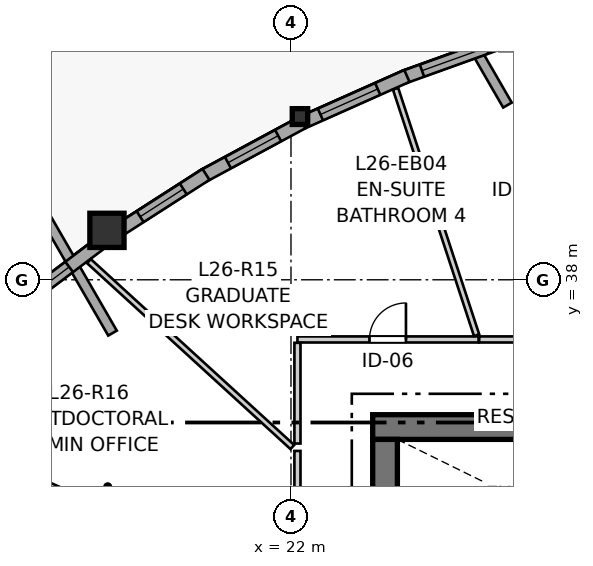
"""IFC4 building model, lengths in metres.
Left out: names, types, materials, properties, quantities, classifications, styles, units other than length and angle.
Written with IfcOpenShell. Run it as: python <this file> out.ifc"""

import sys

from ifc_helpers import new_model, si_unit, direction, frame, frame_2d, origin, origin_2d, place, context, subcontext, project, spatial, rectangle, i_section, extrude, source, transform, mapped, element, fill, save


model = new_model("IFC4")
c1 = context("Model", 3, precision=1e-05, world=origin(), true_north=direction((0.0, 1.0)))
c2 = subcontext(c1, "Body", "Model", "MODEL_VIEW")
j1 = project(units=[si_unit("LENGTHUNIT", "METRE"), si_unit("PLANEANGLEUNIT", "RADIAN")], contexts=[c1])
p1 = place(None, origin())
s1 = spatial("IfcSite", under=j1, at=p1, CompositionType="ELEMENT")
p2 = place(p1, origin())
s2 = spatial("IfcBuilding", under=s1, at=p2, CompositionType="ELEMENT")
p3 = place(p2, frame((0.0, 0.0, 89.6)))
s3 = spatial("IfcBuildingStorey", under=s2, at=p3, CompositionType="ELEMENT", Elevation=89.6)
p4 = place(p3, frame((36.55, 34.125, 0.0), z_axis=(0.0, 0.0, 1.0), x_axis=(-1.0, 0.0, 0.0)))
e1 = element("IfcWall", 1, at=p4, inside=s3, PredefinedType="SHEAR", context=c2, shape_type="SweptSolid", body=[
    extrude(rectangle(XDim=12.4, YDim=0.65, at=frame_2d((6.2, 0.0))), origin(), (0.0, 0.0, 1.0), 2.95),
])
p5 = place(p3, frame((24.475, 33.8, 0.0), z_axis=(0.0, 0.0, 1.0), x_axis=(0.0, -1.0, 0.0)))
e2 = element("IfcWall", 2, at=p5, inside=s3, PredefinedType="SHEAR", context=c2, shape_type="SweptSolid", body=[
    extrude(rectangle(XDim=15.6, YDim=0.65, at=frame_2d((7.8, 0.0))), origin(), (0.0, 0.0, 1.0), 2.95),
])
p6 = place(p5, frame((7.05, 0.0, 0.0)))
e3 = element("IfcOpeningElement", 3, at=p6, cuts=e2, PredefinedType="OPENING", context=c2, shape_type="SweptSolid", body=[
    extrude(rectangle(XDim=1.5, YDim=2.15, at=frame_2d((0.75, 1.075))), frame((0.0, 0.335, 0.0), z_axis=(0.0, -1.0, 0.0), x_axis=(1.0, 0.0, 0.0)), (0.0, 0.0, 1.0), 0.67),
])
p7 = place(p5, frame((3.52, 0.0, 0.0)))
e4 = element("IfcOpeningElement", 4, at=p7, cuts=e2, PredefinedType="OPENING", context=c2, shape_type="SweptSolid", body=[
    extrude(rectangle(XDim=0.86, YDim=2.05, at=frame_2d((0.43, 1.025))), frame((0.0, 0.335, 0.0), z_axis=(0.0, -1.0, 0.0), x_axis=(1.0, 0.0, 0.0)), (0.0, 0.0, 1.0), 0.67),
])
p8 = place(p5, frame((11.22, 0.0, 0.0)))
e5 = element("IfcOpeningElement", 5, at=p8, cuts=e2, PredefinedType="OPENING", context=c2, shape_type="SweptSolid", body=[
    extrude(rectangle(XDim=0.86, YDim=2.05, at=frame_2d((0.43, 1.025))), frame((0.0, 0.335, 0.0), z_axis=(0.0, -1.0, 0.0), x_axis=(1.0, 0.0, 0.0)), (0.0, 0.0, 1.0), 0.67),
])
m1 = source(origin(), c2, "Body", "SweptSolid", [
    extrude(i_section(OverallWidth=0.406, OverallDepth=0.416, WebThickness=0.027, FlangeThickness=0.044, FilletRadius=0.015, at=origin_2d()), origin(), (0.0, 0.0, 1.0), 2.95),
])
p9 = place(p3, frame((22.236, 42.295, 0.0), z_axis=(0.0, 0.0, 1.0), x_axis=(1.0, 0.0, 0.0)))
e6 = element("IfcColumn", 6, at=p9, inside=s3, PredefinedType="PILASTER", context=c2, shape_type="MappedRepresentation", body=[
    mapped(m1, transform((0.0, 0.0, 0.0), x_axis=(1.0, 0.0, 0.0), y_axis=(0.0, 1.0, 0.0), z_axis=(0.0, 0.0, 1.0), scale=1.0)),
])
m2 = source(origin(), c2, "Body", "SweptSolid", [
    extrude(rectangle(XDim=0.9, YDim=0.9, at=origin_2d()), origin(), (0.0, 0.0, 1.0), 2.95),
])
p10 = place(p3, frame((17.157, 39.301, 0.0), z_axis=(0.0, 0.0, 1.0), x_axis=(1.0, 0.0, 0.0)))
e7 = element("IfcColumn", 7, at=p10, inside=s3, PredefinedType="COLUMN", context=c2, shape_type="MappedRepresentation", body=[
    mapped(m2, transform((0.0, 0.0, 0.0), x_axis=(1.0, 0.0, 0.0), y_axis=(0.0, 1.0, 0.0), z_axis=(0.0, 0.0, 1.0), scale=1.0)),
])
for number, where, z_axis, x_axis in (
    (8, (27.696, 42.597, 0.0), (0.0, 0.0, 1.0), (-0.5, 0.866, 0.0)),
    (9, (6.792, 54.803, 0.0), (0.0, 0.0, 1.0), (0.5, -0.866, 0.0)),
):
    element("IfcWall", number, at=place(p3, frame(where, z_axis=z_axis, x_axis=x_axis)), inside=s3, PredefinedType="PARAPET", context=c2, shape_type="SweptSolid", body=[
        extrude(rectangle(XDim=21.023, YDim=0.26, at=frame_2d((10.511, 0.0))), origin(), (0.0, 0.0, 1.0), 0.55),
    ])
p11 = place(p3, frame((27.611, 44.28, 0.0), z_axis=(0.0, 0.0, 1.0), x_axis=(-0.94110108123, -0.338125353836, 0.0)))
e10 = element("IfcWall", 10, at=p11, inside=s3, PredefinedType="SOLIDWALL", context=c2, shape_type="SweptSolid", body=[
    extrude(rectangle(XDim=2.809, YDim=0.34, at=frame_2d((1.404, 0.0))), origin(), (0.0, 0.0, 1.0), 2.48),
])
p12 = place(p11, frame((0.499, 0.0, 0.82)))
e11 = element("IfcOpeningElement", 11, at=p12, cuts=e10, PredefinedType="OPENING", context=c2, shape_type="SweptSolid", body=[
    extrude(rectangle(XDim=1.8, YDim=1.45, at=frame_2d((0.9, 0.725))), frame((0.0, 0.18, 0.0), z_axis=(0.0, -1.0, 0.0), x_axis=(1.0, 0.0, 0.0)), (0.0, 0.0, 1.0), 0.36),
])
p13 = place(p3, frame((25.05, 43.363, 0.0), z_axis=(0.0, 0.0, 1.0), x_axis=(-0.913433400489, -0.406988234315, 0.0)))
e12 = element("IfcWall", 12, at=p13, inside=s3, PredefinedType="SOLIDWALL", context=c2, shape_type="SweptSolid", body=[
    extrude(rectangle(XDim=2.985, YDim=0.34, at=frame_2d((1.492, 0.0))), origin(), (0.0, 0.0, 1.0), 2.48),
])
p14 = place(p13, frame((0.841, 0.0, 0.82)))
e13 = element("IfcOpeningElement", 13, at=p14, cuts=e12, PredefinedType="OPENING", context=c2, shape_type="SweptSolid", body=[
    extrude(rectangle(XDim=1.65, YDim=1.45, at=frame_2d((0.825, 0.725))), frame((0.0, 0.18, 0.0), z_axis=(0.0, -1.0, 0.0), x_axis=(1.0, 0.0, 0.0)), (0.0, 0.0, 1.0), 0.36),
])
p15 = place(p3, frame((22.299, 42.136, 0.0), z_axis=(0.0, 0.0, 1.0), x_axis=(-0.880093106551, -0.474801141323, 0.0)))
e14 = element("IfcWall", 14, at=p15, inside=s3, PredefinedType="SOLIDWALL", context=c2, shape_type="SweptSolid", body=[
    extrude(rectangle(XDim=2.968, YDim=0.34, at=frame_2d((1.484, 0.0))), origin(), (0.0, 0.0, 1.0), 2.48),
])
p16 = place(p15, frame((0.724, 0.0, 0.82)))
e15 = element("IfcOpeningElement", 15, at=p16, cuts=e14, PredefinedType="OPENING", context=c2, shape_type="SweptSolid", body=[
    extrude(rectangle(XDim=1.5, YDim=1.45, at=frame_2d((0.75, 0.725))), frame((0.0, 0.18, 0.0), z_axis=(0.0, -1.0, 0.0), x_axis=(1.0, 0.0, 0.0)), (0.0, 0.0, 1.0), 0.36),
])
p17 = place(p3, frame((19.764, 40.772, 0.0), z_axis=(0.0, 0.0, 1.0), x_axis=(-0.841500460675, -0.54025639717, 0.0)))
e16 = element("IfcWall", 16, at=p17, inside=s3, PredefinedType="SOLIDWALL", context=c2, shape_type="SweptSolid", body=[
    extrude(rectangle(XDim=2.758, YDim=0.34, at=frame_2d((1.379, 0.0))), origin(), (0.0, 0.0, 1.0), 2.48),
])
p18 = place(p17, frame((0.709, 0.0, 0.82)))
e17 = element("IfcOpeningElement", 17, at=p18, cuts=e16, PredefinedType="OPENING", context=c2, shape_type="SweptSolid", body=[
    extrude(rectangle(XDim=1.35, YDim=1.45, at=frame_2d((0.675, 0.725))), frame((0.0, 0.18, 0.0), z_axis=(0.0, -1.0, 0.0), x_axis=(1.0, 0.0, 0.0)), (0.0, 0.0, 1.0), 0.36),
])
p19 = place(p3, frame((17.076, 39.027, 0.0), z_axis=(0.0, 0.0, 1.0), x_axis=(-0.798403009583, -0.602123437751, 0.0)))
e18 = element("IfcWall", 18, at=p19, inside=s3, PredefinedType="SOLIDWALL", context=c2, shape_type="SweptSolid", body=[
    extrude(rectangle(XDim=2.775, YDim=0.34, at=frame_2d((1.387, 0.0))), origin(), (0.0, 0.0, 1.0), 2.48),
])
p20 = place(p19, frame((1.144, 0.0, 0.82)))
e19 = element("IfcOpeningElement", 19, at=p20, cuts=e18, PredefinedType="OPENING", context=c2, shape_type="SweptSolid", body=[
    extrude(rectangle(XDim=1.05, YDim=1.45, at=frame_2d((0.525, 0.725))), frame((0.0, 0.18, 0.0), z_axis=(0.0, -1.0, 0.0), x_axis=(1.0, 0.0, 0.0)), (0.0, 0.0, 1.0), 0.36),
])
p21 = place(p3, frame((22.17, 36.43, 0.0), z_axis=(0.0, 0.0, 1.0), x_axis=(1.0, 0.0, 0.0)))
e20 = element("IfcWall", 20, at=p21, inside=s3, PredefinedType="PARTITIONING", context=c2, shape_type="SweptSolid", body=[
    extrude(rectangle(XDim=4.767, YDim=0.16, at=frame_2d((2.384, 0.0))), origin(), (0.0, 0.0, 1.0), 2.588),
])
p22 = place(p21, frame((1.896, 0.0, 0.0)))
e21 = element("IfcOpeningElement", 21, at=p22, cuts=e20, PredefinedType="OPENING", context=c2, shape_type="SweptSolid", body=[
    extrude(rectangle(XDim=0.96, YDim=2.1, at=frame_2d((0.48, 1.05))), frame((0.0, 0.09, 0.0), z_axis=(0.0, -1.0, 0.0), x_axis=(1.0, 0.0, 0.0)), (0.0, 0.0, 1.0), 0.18),
])
p23 = place(p3, frame((22.17, 29.65, 0.0), z_axis=(0.0, 0.0, 1.0), x_axis=(0.0, 1.0, 0.0)))
e22 = element("IfcWall", 22, at=p23, inside=s3, PredefinedType="PARTITIONING", context=c2, shape_type="SweptSolid", body=[
    extrude(rectangle(XDim=3.847, YDim=0.16, at=frame_2d((1.924, 0.0))), origin(), (0.0, 0.0, 1.0), 2.95),
])
p24 = place(p23, frame((1.441, 0.0, 0.0)))
e23 = element("IfcOpeningElement", 23, at=p24, cuts=e22, PredefinedType="OPENING", context=c2, shape_type="SweptSolid", body=[
    extrude(rectangle(XDim=0.96, YDim=2.1, at=frame_2d((0.48, 1.05))), frame((0.0, 0.09, 0.0), z_axis=(0.0, -1.0, 0.0), x_axis=(1.0, 0.0, 0.0)), (0.0, 0.0, 1.0), 0.18),
])
p25 = place(p3, frame((26.952, 36.43, 0.0), z_axis=(0.0, 0.0, 1.0), x_axis=(1.0, 0.0, 0.0)))
e24 = element("IfcWall", 24, at=p25, inside=s3, PredefinedType="PARTITIONING", context=c2, shape_type="SweptSolid", body=[
    extrude(rectangle(XDim=3.562, YDim=0.16, at=frame_2d((1.781, 0.0))), origin(), (0.0, 0.0, 1.0), 2.95),
])
p26 = place(p25, frame((1.298, 0.0, 0.0)))
e25 = element("IfcOpeningElement", 25, at=p26, cuts=e24, PredefinedType="OPENING", context=c2, shape_type="SweptSolid", body=[
    extrude(rectangle(XDim=0.92, YDim=2.1, at=frame_2d((0.46, 1.05))), frame((0.0, 0.09, 0.0), z_axis=(0.0, -1.0, 0.0), x_axis=(1.0, 0.0, 0.0)), (0.0, 0.0, 1.0), 0.18),
])
p27 = place(p3, frame((11.817, 34.307, 0.0), z_axis=(0.0, 0.0, 1.0), x_axis=(0.912528092457, -0.409014034572, 0.0)))
e26 = element("IfcWall", 26, at=p27, inside=s3, PredefinedType="PARTITIONING", context=c2, shape_type="SweptSolid", body=[
    extrude(rectangle(XDim=11.218, YDim=0.145, at=frame_2d((5.609, 0.0))), origin(), (0.0, 0.0, 1.0), 2.95),
])
p28 = place(p3, frame((16.683, 38.491, 0.0), z_axis=(0.0, 0.0, 1.0), x_axis=(0.738145700324, -0.674641330704, 0.0)))
e27 = element("IfcWall", 27, at=p28, inside=s3, PredefinedType="PARTITIONING", context=c2, shape_type="SweptSolid", body=[
    extrude(rectangle(XDim=7.251, YDim=0.145, at=frame_2d((3.625, 0.0))), origin(), (0.0, 0.0, 1.0), 2.95),
])
p29 = place(p3, frame((24.752, 43.027, 0.0), z_axis=(0.0, 0.0, 1.0), x_axis=(0.312342290808, -0.949969627606, 0.0)))
e28 = element("IfcWall", 28, at=p29, inside=s3, PredefinedType="PARTITIONING", context=c2, shape_type="SweptSolid", body=[
    extrude(rectangle(XDim=6.828, YDim=0.145, at=frame_2d((3.414, 0.0))), origin(), (0.0, 0.0, 1.0), 2.95),
])
p30 = place(p3, frame((22.17, 33.691, 0.0), z_axis=(0.0, 0.0, 1.0), x_axis=(0.0, 1.0, 0.0)))
e29 = element("IfcWall", 29, at=p30, inside=s3, PredefinedType="PARTITIONING", context=c2, shape_type="SweptSolid", body=[
    extrude(rectangle(XDim=2.651, YDim=0.16, at=frame_2d((1.325, 0.0))), origin(), (0.0, 0.0, 1.0), 2.95),
])
m3 = source(origin(), c2, "Body", "SweptSolid", [
    extrude(rectangle(XDim=1.8, YDim=1.45, at=frame_2d((0.9, 0.725))), frame((0.0, 0.03, 0.0), z_axis=(0.0, -1.0, 0.0), x_axis=(1.0, 0.0, 0.0)), (0.0, 0.0, 1.0), 0.06),
])
p31 = place(p12, origin())
e30 = element("IfcWindow", 30, at=p31, inside=s3, PartitioningType="SINGLE_PANEL", PredefinedType="WINDOW", context=c2, shape_type="MappedRepresentation", body=[
    mapped(m3, transform((0.0, 0.0, 0.0), x_axis=(1.0, 0.0, 0.0), y_axis=(0.0, 1.0, 0.0), z_axis=(0.0, 0.0, 1.0), scale=1.0)),
])
fill(e11, e30)
m4 = source(origin(), c2, "Body", "SweptSolid", [
    extrude(rectangle(XDim=1.65, YDim=1.45, at=frame_2d((0.825, 0.725))), frame((0.0, 0.03, 0.0), z_axis=(0.0, -1.0, 0.0), x_axis=(1.0, 0.0, 0.0)), (0.0, 0.0, 1.0), 0.06),
])
p32 = place(p14, origin())
e31 = element("IfcWindow", 31, at=p32, inside=s3, PartitioningType="SINGLE_PANEL", PredefinedType="WINDOW", context=c2, shape_type="MappedRepresentation", body=[
    mapped(m4, transform((0.0, 0.0, 0.0), x_axis=(1.0, 0.0, 0.0), y_axis=(0.0, 1.0, 0.0), z_axis=(0.0, 0.0, 1.0), scale=1.0)),
])
fill(e13, e31)
m5 = source(origin(), c2, "Body", "SweptSolid", [
    extrude(rectangle(XDim=1.5, YDim=1.45, at=frame_2d((0.75, 0.725))), frame((0.0, 0.03, 0.0), z_axis=(0.0, -1.0, 0.0), x_axis=(1.0, 0.0, 0.0)), (0.0, 0.0, 1.0), 0.06),
])
p33 = place(p16, origin())
e32 = element("IfcWindow", 32, at=p33, inside=s3, PartitioningType="SINGLE_PANEL", PredefinedType="WINDOW", context=c2, shape_type="MappedRepresentation", body=[
    mapped(m5, transform((0.0, 0.0, 0.0), x_axis=(1.0, 0.0, 0.0), y_axis=(0.0, 1.0, 0.0), z_axis=(0.0, 0.0, 1.0), scale=1.0)),
])
fill(e15, e32)
m6 = source(origin(), c2, "Body", "SweptSolid", [
    extrude(rectangle(XDim=1.35, YDim=1.45, at=frame_2d((0.675, 0.725))), frame((0.0, 0.03, 0.0), z_axis=(0.0, -1.0, 0.0), x_axis=(1.0, 0.0, 0.0)), (0.0, 0.0, 1.0), 0.06),
])
p34 = place(p18, origin())
e33 = element("IfcWindow", 33, at=p34, inside=s3, PartitioningType="SINGLE_PANEL", PredefinedType="WINDOW", context=c2, shape_type="MappedRepresentation", body=[
    mapped(m6, transform((0.0, 0.0, 0.0), x_axis=(1.0, 0.0, 0.0), y_axis=(0.0, 1.0, 0.0), z_axis=(0.0, 0.0, 1.0), scale=1.0)),
])
fill(e17, e33)
m7 = source(origin(), c2, "Body", "SweptSolid", [
    extrude(rectangle(XDim=1.05, YDim=1.45, at=frame_2d((0.525, 0.725))), frame((0.0, 0.03, 0.0), z_axis=(0.0, -1.0, 0.0), x_axis=(1.0, 0.0, 0.0)), (0.0, 0.0, 1.0), 0.06),
])
p35 = place(p20, origin())
e34 = element("IfcWindow", 34, at=p35, inside=s3, PartitioningType="SINGLE_PANEL", PredefinedType="WINDOW", context=c2, shape_type="MappedRepresentation", body=[
    mapped(m7, transform((0.0, 0.0, 0.0), x_axis=(1.0, 0.0, 0.0), y_axis=(0.0, 1.0, 0.0), z_axis=(0.0, 0.0, 1.0), scale=1.0)),
])
fill(e19, e34)
m8 = source(origin(), c2, "Body", "SweptSolid", [
    extrude(rectangle(XDim=0.96, YDim=2.1, at=frame_2d((0.48, 1.05))), frame((0.0, 0.025, 0.0), z_axis=(0.0, -1.0, 0.0), x_axis=(1.0, 0.0, 0.0)), (0.0, 0.0, 1.0), 0.05),
])
p36 = place(p22, origin())
e35 = element("IfcDoor", 35, at=p36, inside=s3, OperationType="SINGLE_SWING_RIGHT", PredefinedType="DOOR", context=c2, shape_type="MappedRepresentation", body=[
    mapped(m8, transform((0.0, 0.0, 0.0), x_axis=(1.0, 0.0, 0.0), y_axis=(0.0, 1.0, 0.0), z_axis=(0.0, 0.0, 1.0), scale=1.0)),
])
fill(e21, e35)
save(model, sys.argv[1])
